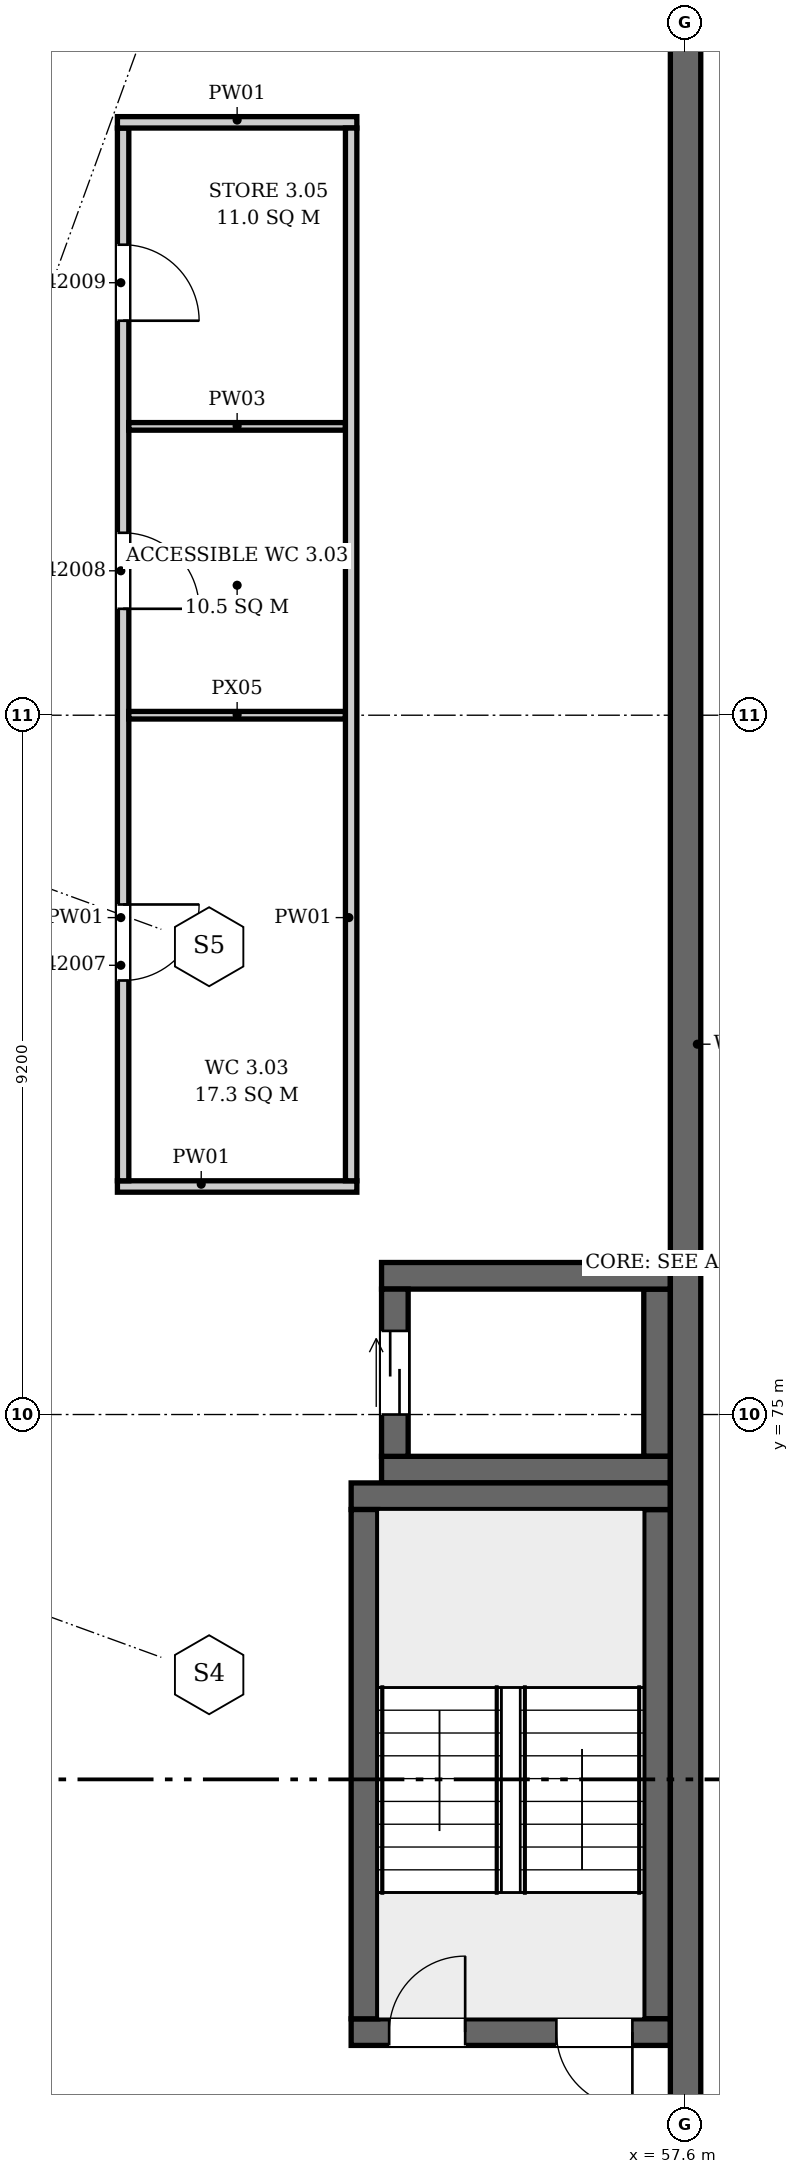
"""IFC4 building model, lengths in metres.
Left out: names, types, materials, properties, quantities, classifications, styles, units other than length and angle.
Written with IfcOpenShell. Run it as: python <this file> out.ifc"""

import sys

from ifc_helpers import new_model, si_unit, direction, frame, frame_2d, origin, place, context, subcontext, project, spatial, rectangle, extrude, element, fill, save


model = new_model("IFC4")
c1 = context("Model", 3, precision=1e-05, world=origin(), true_north=direction((0.0, 1.0)))
c2 = subcontext(c1, "Body", "Model", "MODEL_VIEW")
j1 = project(units=[si_unit("LENGTHUNIT", "METRE"), si_unit("PLANEANGLEUNIT", "RADIAN")], contexts=[c1])
p1 = place(None, origin())
s1 = spatial("IfcSite", under=j1, at=p1, CompositionType="ELEMENT")
p2 = place(p1, origin())
s2 = spatial("IfcBuilding", under=s1, at=p2, CompositionType="ELEMENT")
p3 = place(p2, frame((0.0, 0.0, 21.7)))
s3 = spatial("IfcBuildingStorey", under=s2, at=p3, CompositionType="ELEMENT", Elevation=21.7)
p4 = place(p3, frame((57.6, 46.72, 0.0), z_axis=(0.0, 0.0, 1.0), x_axis=(0.0, 1.0, 0.0)))
e1 = element("IfcWall", 1, at=p4, inside=s3, PredefinedType="SHEAR", context=c2, shape_type="SweptSolid", body=[
    extrude(rectangle(XDim=47.36, YDim=0.4, at=frame_2d((23.68, 0.0))), origin(), (0.0, 0.0, 1.0), 5.0),
])
p5 = place(p3, frame((53.2, 66.875, 0.0), z_axis=(0.0, 0.0, 1.0), x_axis=(1.0, 0.0, 0.0)))
e2 = element("IfcWall", 2, at=p5, inside=s3, PredefinedType="SHEAR", context=c2, shape_type="SweptSolid", body=[
    extrude(rectangle(XDim=4.2, YDim=0.35, at=frame_2d((2.1, 0.0))), origin(), (0.0, 0.0, 1.0), 5.0),
])
p6 = place(p5, frame((0.5, 0.0, 0.0)))
e3 = element("IfcOpeningElement", 3, at=p6, cuts=e2, PredefinedType="OPENING", context=c2, shape_type="SweptSolid", body=[
    extrude(rectangle(XDim=1.0, YDim=2.1, at=frame_2d((0.5, 1.05))), frame((0.0, 0.185, 0.0), z_axis=(0.0, -1.0, 0.0), x_axis=(1.0, 0.0, 0.0)), (0.0, 0.0, 1.0), 0.37),
])
p7 = place(p5, frame((2.7, 0.0, 0.0)))
e4 = element("IfcOpeningElement", 4, at=p7, cuts=e2, PredefinedType="OPENING", context=c2, shape_type="SweptSolid", body=[
    extrude(rectangle(XDim=1.0, YDim=2.1, at=frame_2d((0.5, 1.05))), frame((0.0, 0.185, 0.0), z_axis=(0.0, -1.0, 0.0), x_axis=(1.0, 0.0, 0.0)), (0.0, 0.0, 1.0), 0.37),
])
p8 = place(p3, frame((53.2, 73.925, 0.0), z_axis=(0.0, 0.0, 1.0), x_axis=(1.0, 0.0, 0.0)))
e5 = element("IfcWall", 5, at=p8, inside=s3, PredefinedType="SHEAR", context=c2, shape_type="SweptSolid", body=[
    extrude(rectangle(XDim=4.2, YDim=0.35, at=frame_2d((2.1, 0.0))), origin(), (0.0, 0.0, 1.0), 5.0),
])
for number, where, z_axis, x_axis in (
    (6, (53.375, 67.05, 0.0), (0.0, 0.0, 1.0), (0.0, 1.0, 0.0)),
    (7, (57.225, 67.05, 0.0), (0.0, 0.0, 1.0), (0.0, 1.0, 0.0)),
):
    element("IfcWall", number, at=place(p3, frame(where, z_axis=z_axis, x_axis=x_axis)), inside=s3, PredefinedType="SHEAR", context=c2, shape_type="SweptSolid", body=[
        extrude(rectangle(XDim=6.7, YDim=0.35, at=frame_2d((3.35, 0.0))), origin(), (0.0, 0.0, 1.0), 5.0),
    ])
for number, where, z_axis, x_axis in (
    (8, (53.6, 74.275, 0.0), (0.0, 0.0, 1.0), (1.0, 0.0, 0.0)),
    (9, (53.6, 76.825, 0.0), (0.0, 0.0, 1.0), (1.0, 0.0, 0.0)),
):
    element("IfcWall", number, at=place(p3, frame(where, z_axis=z_axis, x_axis=x_axis)), inside=s3, PredefinedType="SHEAR", context=c2, shape_type="SweptSolid", body=[
        extrude(rectangle(XDim=3.8, YDim=0.35, at=frame_2d((1.9, 0.0))), origin(), (0.0, 0.0, 1.0), 5.0),
    ])
p9 = place(p3, frame((53.775, 74.45, 0.0), z_axis=(0.0, 0.0, 1.0), x_axis=(0.0, 1.0, 0.0)))
e10 = element("IfcWall", 10, at=p9, inside=s3, PredefinedType="SHEAR", context=c2, shape_type="SweptSolid", body=[
    extrude(rectangle(XDim=2.2, YDim=0.35, at=frame_2d((1.1, 0.0))), origin(), (0.0, 0.0, 1.0), 5.0),
])
p10 = place(p9, frame((0.55, 0.0, 0.0)))
e11 = element("IfcOpeningElement", 11, at=p10, cuts=e10, PredefinedType="OPENING", context=c2, shape_type="SweptSolid", body=[
    extrude(rectangle(XDim=1.1, YDim=2.1, at=frame_2d((0.55, 1.05))), frame((0.0, 0.185, 0.0), z_axis=(0.0, -1.0, 0.0), x_axis=(1.0, 0.0, 0.0)), (0.0, 0.0, 1.0), 0.37),
])
p11 = place(p3, frame((57.225, 74.45, 0.0), z_axis=(0.0, 0.0, 1.0), x_axis=(0.0, 1.0, 0.0)))
e12 = element("IfcWall", 12, at=p11, inside=s3, PredefinedType="SHEAR", context=c2, shape_type="SweptSolid", body=[
    extrude(rectangle(XDim=2.2, YDim=0.35, at=frame_2d((1.1, 0.0))), origin(), (0.0, 0.0, 1.0), 5.0),
])
p12 = place(p3, frame((50.125, 78.0, 0.0), z_axis=(0.0, 0.0, 1.0), x_axis=(1.0, 0.0, 0.0)))
e13 = element("IfcWall", 13, at=p12, inside=s3, PredefinedType="PARTITIONING", context=c2, shape_type="SweptSolid", body=[
    extrude(rectangle(XDim=3.15, YDim=0.15, at=frame_2d((1.575, 0.0))), origin(), (0.0, 0.0, 1.0), 4.65),
])
p13 = place(p3, frame((50.2, 78.075, 0.0), z_axis=(0.0, 0.0, 1.0), x_axis=(0.0, 1.0, 0.0)))
e14 = element("IfcWall", 14, at=p13, inside=s3, PredefinedType="PARTITIONING", context=c2, shape_type="SweptSolid", body=[
    extrude(rectangle(XDim=13.85, YDim=0.15, at=frame_2d((6.925, 0.0))), origin(), (0.0, 0.0, 1.0), 4.65),
])
p14 = place(p13, frame((2.635, 0.0, 0.0)))
e15 = element("IfcOpeningElement", 15, at=p14, cuts=e14, PredefinedType="OPENING", context=c2, shape_type="SweptSolid", body=[
    extrude(rectangle(XDim=1.0, YDim=2.1, at=frame_2d((0.5, 1.05))), frame((0.0, 0.085, 0.0), z_axis=(0.0, -1.0, 0.0), x_axis=(1.0, 0.0, 0.0)), (0.0, 0.0, 1.0), 0.17),
])
p15 = place(p13, frame((7.525, 0.0, 0.0)))
e16 = element("IfcOpeningElement", 16, at=p15, cuts=e14, PredefinedType="OPENING", context=c2, shape_type="SweptSolid", body=[
    extrude(rectangle(XDim=1.0, YDim=2.1, at=frame_2d((0.5, 1.05))), frame((0.0, 0.085, 0.0), z_axis=(0.0, -1.0, 0.0), x_axis=(1.0, 0.0, 0.0)), (0.0, 0.0, 1.0), 0.17),
])
p16 = place(p13, frame((11.315, 0.0, 0.0)))
e17 = element("IfcOpeningElement", 17, at=p16, cuts=e14, PredefinedType="OPENING", context=c2, shape_type="SweptSolid", body=[
    extrude(rectangle(XDim=1.0, YDim=2.1, at=frame_2d((0.5, 1.05))), frame((0.0, 0.085, 0.0), z_axis=(0.0, -1.0, 0.0), x_axis=(1.0, 0.0, 0.0)), (0.0, 0.0, 1.0), 0.17),
])
p17 = place(p3, frame((50.125, 92.0, 0.0), z_axis=(0.0, 0.0, 1.0), x_axis=(1.0, 0.0, 0.0)))
e18 = element("IfcWall", 18, at=p17, inside=s3, PredefinedType="PARTITIONING", context=c2, shape_type="SweptSolid", body=[
    extrude(rectangle(XDim=3.15, YDim=0.15, at=frame_2d((1.575, 0.0))), origin(), (0.0, 0.0, 1.0), 4.65),
])
p18 = place(p3, frame((50.275, 84.2, 0.0), z_axis=(0.0, 0.0, 1.0), x_axis=(1.0, 0.0, 0.0)))
e19 = element("IfcWall", 19, at=p18, inside=s3, PredefinedType="PARTITIONING", context=c2, shape_type="SweptSolid", body=[
    extrude(rectangle(XDim=2.85, YDim=0.1, at=frame_2d((1.425, 0.0))), origin(), (0.0, 0.0, 1.0), 4.25),
])
p19 = place(p3, frame((50.275, 88.0, 0.0), z_axis=(0.0, 0.0, 1.0), x_axis=(1.0, 0.0, 0.0)))
e20 = element("IfcWall", 20, at=p19, inside=s3, PredefinedType="PARTITIONING", context=c2, shape_type="SweptSolid", body=[
    extrude(rectangle(XDim=2.85, YDim=0.1, at=frame_2d((1.425, 0.0))), origin(), (0.0, 0.0, 1.0), 4.65),
])
p20 = place(p3, frame((53.2, 78.075, 0.0), z_axis=(0.0, 0.0, 1.0), x_axis=(0.0, 1.0, 0.0)))
e21 = element("IfcWall", 21, at=p20, inside=s3, PredefinedType="PARTITIONING", context=c2, shape_type="SweptSolid", body=[
    extrude(rectangle(XDim=13.85, YDim=0.15, at=frame_2d((6.925, 0.0))), origin(), (0.0, 0.0, 1.0), 4.65),
])
p21 = place(p6, origin())
e22 = element("IfcDoor", 22, at=p21, inside=s3, OperationType="SINGLE_SWING_RIGHT", PredefinedType="DOOR", context=c2, shape_type="SweptSolid", body=[
    extrude(rectangle(XDim=1.0, YDim=2.1, at=frame_2d((0.5, 1.05))), frame((0.0, 0.025, 0.0), z_axis=(0.0, -1.0, 0.0), x_axis=(1.0, 0.0, 0.0)), (0.0, 0.0, 1.0), 0.05),
])
fill(e3, e22)
p22 = place(p7, origin())
e23 = element("IfcDoor", 23, at=p22, inside=s3, OperationType="SINGLE_SWING_LEFT", PredefinedType="DOOR", context=c2, shape_type="SweptSolid", body=[
    extrude(rectangle(XDim=1.0, YDim=2.1, at=frame_2d((0.5, 1.05))), frame((0.0, 0.025, 0.0), z_axis=(0.0, -1.0, 0.0), x_axis=(1.0, 0.0, 0.0)), (0.0, 0.0, 1.0), 0.05),
])
fill(e4, e23)
p23 = place(p10, origin())
e24 = element("IfcDoor", 24, at=p23, inside=s3, OperationType="DOUBLE_DOOR_SLIDING", PredefinedType="DOOR", context=c2, shape_type="SweptSolid", body=[
    extrude(rectangle(XDim=1.1, YDim=2.1, at=frame_2d((0.55, 1.05))), frame((0.0, 0.025, 0.0), z_axis=(0.0, -1.0, 0.0), x_axis=(1.0, 0.0, 0.0)), (0.0, 0.0, 1.0), 0.05),
])
fill(e11, e24)
p24 = place(p14, origin())
e25 = element("IfcDoor", 25, at=p24, inside=s3, OperationType="SINGLE_SWING_RIGHT", PredefinedType="DOOR", context=c2, shape_type="SweptSolid", body=[
    extrude(rectangle(XDim=1.0, YDim=2.1, at=frame_2d((0.5, 1.05))), frame((0.0, 0.025, 0.0), z_axis=(0.0, -1.0, 0.0), x_axis=(1.0, 0.0, 0.0)), (0.0, 0.0, 1.0), 0.05),
])
fill(e15, e25)
p25 = place(p15, origin())
e26 = element("IfcDoor", 26, at=p25, inside=s3, OperationType="SINGLE_SWING_LEFT", PredefinedType="DOOR", context=c2, shape_type="SweptSolid", body=[
    extrude(rectangle(XDim=1.0, YDim=2.1, at=frame_2d((0.5, 1.05))), frame((0.0, 0.025, 0.0), z_axis=(0.0, -1.0, 0.0), x_axis=(1.0, 0.0, 0.0)), (0.0, 0.0, 1.0), 0.05),
])
fill(e16, e26)
p26 = place(p16, origin())
e27 = element("IfcDoor", 27, at=p26, inside=s3, OperationType="SINGLE_SWING_LEFT", PredefinedType="DOOR", context=c2, shape_type="SweptSolid", body=[
    extrude(rectangle(XDim=1.0, YDim=2.1, at=frame_2d((0.5, 1.05))), frame((0.0, 0.025, 0.0), z_axis=(0.0, -1.0, 0.0), x_axis=(1.0, 0.0, 0.0)), (0.0, 0.0, 1.0), 0.05),
])
fill(e17, e27)
save(model, sys.argv[1])
